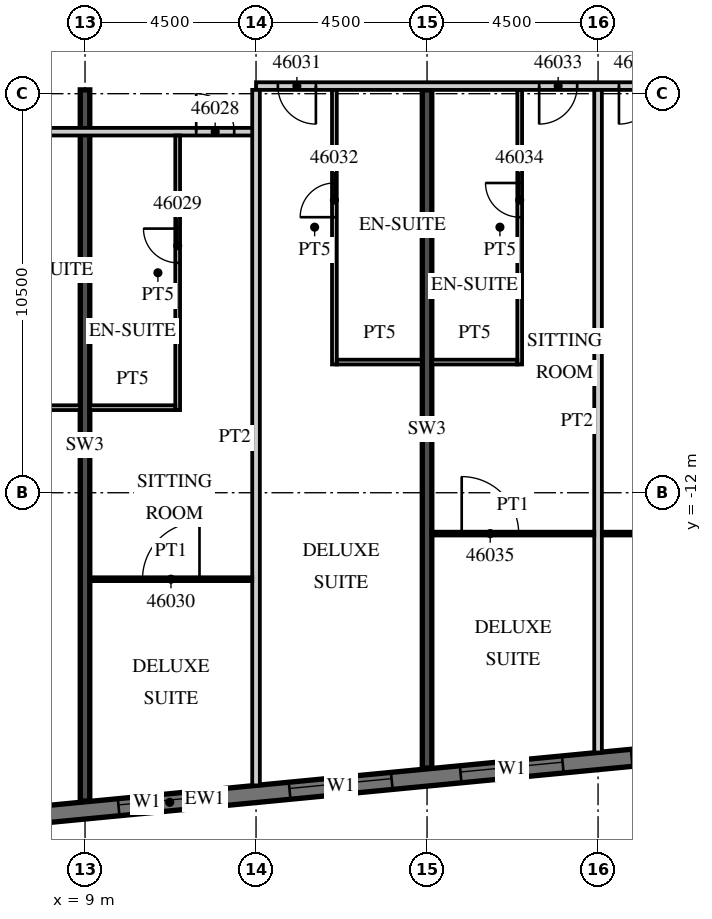
"""IFC4 building model, lengths in metres.
Left out: names, types, materials, properties, quantities, classifications, styles, units other than length and angle.
Written with IfcOpenShell. Run it as: python <this file> out.ifc"""

import sys

from ifc_helpers import new_model, si_unit, direction, frame, frame_2d, origin, place, context, subcontext, project, spatial, rectangle, extrude, element, fill, save


model = new_model("IFC4")
c1 = context("Model", 3, precision=1e-05, world=origin(), true_north=direction((0.0, 1.0)))
c2 = subcontext(c1, "Body", "Model", "MODEL_VIEW")
j1 = project(units=[si_unit("LENGTHUNIT", "METRE"), si_unit("PLANEANGLEUNIT", "RADIAN")], contexts=[c1])
p1 = place(None, origin())
s1 = spatial("IfcSite", under=j1, at=p1, CompositionType="ELEMENT")
p2 = place(p1, origin())
s2 = spatial("IfcBuilding", under=s1, at=p2, CompositionType="ELEMENT")
p3 = place(p2, frame((0.0, 0.0, 193.3)))
s3 = spatial("IfcBuildingStorey", under=s2, at=p3, CompositionType="ELEMENT", Elevation=193.3)
p4 = place(p3, frame((9.0, -20.112, 0.0), z_axis=(0.0, 0.0, 1.0), x_axis=(0.0, 1.0, 0.0)))
e1 = element("IfcWall", 1, at=p4, inside=s3, PredefinedType="SHEAR", context=c2, shape_type="SweptSolid", body=[
    extrude(rectangle(XDim=18.712, YDim=0.25, at=frame_2d((9.356, 0.0))), origin(), (0.0, 0.0, 1.0), 3.3),
])
p5 = place(p3, frame((18.0, -19.245, 0.0), z_axis=(0.0, 0.0, 1.0), x_axis=(0.0, 1.0, 0.0)))
e2 = element("IfcWall", 2, at=p5, inside=s3, PredefinedType="SHEAR", context=c2, shape_type="SweptSolid", body=[
    extrude(rectangle(XDim=17.845, YDim=0.25, at=frame_2d((8.923, 0.0))), origin(), (0.0, 0.0, 1.0), 3.3),
])
p6 = place(p3, frame((-13.521, -22.529, 0.0), z_axis=(0.0, 0.0, 1.0), x_axis=(0.995396436651, 0.095843277819, 0.0)))
e3 = element("IfcWall", 3, at=p6, inside=s3, PredefinedType="SOLIDWALL", context=c2, shape_type="SweptSolid", body=[
    extrude(rectangle(XDim=51.578, YDim=0.45, at=frame_2d((25.789, 0.0))), origin(), (0.0, 0.0, 1.0), 3.02),
])
p7 = place(p6, frame((0.91, 0.0, 0.45)))
e4 = element("IfcOpeningElement", 4, at=p7, cuts=e3, PredefinedType="OPENING", context=c2, shape_type="SweptSolid", body=[
    extrude(rectangle(XDim=2.7, YDim=2.25, at=frame_2d((1.35, 1.125))), frame((0.0, 0.235, 0.0), z_axis=(0.0, -1.0, 0.0), x_axis=(1.0, 0.0, 0.0)), (0.0, 0.0, 1.0), 0.47),
])
p8 = place(p6, frame((5.431, 0.0, 0.45)))
e5 = element("IfcOpeningElement", 5, at=p8, cuts=e3, PredefinedType="OPENING", context=c2, shape_type="SweptSolid", body=[
    extrude(rectangle(XDim=2.7, YDim=2.25, at=frame_2d((1.35, 1.125))), frame((0.0, 0.235, 0.0), z_axis=(0.0, -1.0, 0.0), x_axis=(1.0, 0.0, 0.0)), (0.0, 0.0, 1.0), 0.47),
])
p9 = place(p6, frame((9.952, 0.0, 0.45)))
e6 = element("IfcOpeningElement", 6, at=p9, cuts=e3, PredefinedType="OPENING", context=c2, shape_type="SweptSolid", body=[
    extrude(rectangle(XDim=2.7, YDim=2.25, at=frame_2d((1.35, 1.125))), frame((0.0, 0.235, 0.0), z_axis=(0.0, -1.0, 0.0), x_axis=(1.0, 0.0, 0.0)), (0.0, 0.0, 1.0), 0.47),
])
p10 = place(p6, frame((14.473, 0.0, 0.45)))
e7 = element("IfcOpeningElement", 7, at=p10, cuts=e3, PredefinedType="OPENING", context=c2, shape_type="SweptSolid", body=[
    extrude(rectangle(XDim=2.7, YDim=2.25, at=frame_2d((1.35, 1.125))), frame((0.0, 0.235, 0.0), z_axis=(0.0, -1.0, 0.0), x_axis=(1.0, 0.0, 0.0)), (0.0, 0.0, 1.0), 0.47),
])
p11 = place(p6, frame((18.994, 0.0, 0.45)))
e8 = element("IfcOpeningElement", 8, at=p11, cuts=e3, PredefinedType="OPENING", context=c2, shape_type="SweptSolid", body=[
    extrude(rectangle(XDim=2.7, YDim=2.25, at=frame_2d((1.35, 1.125))), frame((0.0, 0.235, 0.0), z_axis=(0.0, -1.0, 0.0), x_axis=(1.0, 0.0, 0.0)), (0.0, 0.0, 1.0), 0.47),
])
p12 = place(p6, frame((23.514, 0.0, 0.45)))
e9 = element("IfcOpeningElement", 9, at=p12, cuts=e3, PredefinedType="OPENING", context=c2, shape_type="SweptSolid", body=[
    extrude(rectangle(XDim=2.7, YDim=2.25, at=frame_2d((1.35, 1.125))), frame((0.0, 0.235, 0.0), z_axis=(0.0, -1.0, 0.0), x_axis=(1.0, 0.0, 0.0)), (0.0, 0.0, 1.0), 0.47),
])
p13 = place(p6, frame((28.035, 0.0, 0.45)))
e10 = element("IfcOpeningElement", 10, at=p13, cuts=e3, PredefinedType="OPENING", context=c2, shape_type="SweptSolid", body=[
    extrude(rectangle(XDim=2.7, YDim=2.25, at=frame_2d((1.35, 1.125))), frame((0.0, 0.235, 0.0), z_axis=(0.0, -1.0, 0.0), x_axis=(1.0, 0.0, 0.0)), (0.0, 0.0, 1.0), 0.47),
])
p14 = place(p6, frame((32.556, 0.0, 0.45)))
e11 = element("IfcOpeningElement", 11, at=p14, cuts=e3, PredefinedType="OPENING", context=c2, shape_type="SweptSolid", body=[
    extrude(rectangle(XDim=2.7, YDim=2.25, at=frame_2d((1.35, 1.125))), frame((0.0, 0.235, 0.0), z_axis=(0.0, -1.0, 0.0), x_axis=(1.0, 0.0, 0.0)), (0.0, 0.0, 1.0), 0.47),
])
p15 = place(p6, frame((37.077, 0.0, 0.45)))
e12 = element("IfcOpeningElement", 12, at=p15, cuts=e3, PredefinedType="OPENING", context=c2, shape_type="SweptSolid", body=[
    extrude(rectangle(XDim=2.7, YDim=2.25, at=frame_2d((1.35, 1.125))), frame((0.0, 0.235, 0.0), z_axis=(0.0, -1.0, 0.0), x_axis=(1.0, 0.0, 0.0)), (0.0, 0.0, 1.0), 0.47),
])
p16 = place(p6, frame((41.598, 0.0, 0.45)))
e13 = element("IfcOpeningElement", 13, at=p16, cuts=e3, PredefinedType="OPENING", context=c2, shape_type="SweptSolid", body=[
    extrude(rectangle(XDim=2.7, YDim=2.25, at=frame_2d((1.35, 1.125))), frame((0.0, 0.235, 0.0), z_axis=(0.0, -1.0, 0.0), x_axis=(1.0, 0.0, 0.0)), (0.0, 0.0, 1.0), 0.47),
])
p17 = place(p6, frame((46.119, 0.0, 0.45)))
e14 = element("IfcOpeningElement", 14, at=p17, cuts=e3, PredefinedType="OPENING", context=c2, shape_type="SweptSolid", body=[
    extrude(rectangle(XDim=2.7, YDim=2.25, at=frame_2d((1.35, 1.125))), frame((0.0, 0.235, 0.0), z_axis=(0.0, -1.0, 0.0), x_axis=(1.0, 0.0, 0.0)), (0.0, 0.0, 1.0), 0.47),
])
p18 = place(p3, frame((-13.5, -2.5, 0.0), z_axis=(0.0, 0.0, 1.0), x_axis=(1.0, 0.0, 0.0)))
e15 = element("IfcWall", 15, at=p18, inside=s3, PredefinedType="PARTITIONING", context=c2, shape_type="SweptSolid", body=[
    extrude(rectangle(XDim=27.0, YDim=0.2, at=frame_2d((13.5, 0.0))), origin(), (0.0, 0.0, 1.0), 3.02),
])
p19 = place(p18, frame((2.925, 0.0, 0.0)))
e16 = element("IfcOpeningElement", 16, at=p19, cuts=e15, PredefinedType="OPENING", context=c2, shape_type="SweptSolid", body=[
    extrude(rectangle(XDim=1.0, YDim=2.1, at=frame_2d((0.5, 1.05))), frame((0.0, 0.11, 0.0), z_axis=(0.0, -1.0, 0.0), x_axis=(1.0, 0.0, 0.0)), (0.0, 0.0, 1.0), 0.22),
])
p20 = place(p18, frame((5.075, 0.0, 0.0)))
e17 = element("IfcOpeningElement", 17, at=p20, cuts=e15, PredefinedType="OPENING", context=c2, shape_type="SweptSolid", body=[
    extrude(rectangle(XDim=1.0, YDim=2.1, at=frame_2d((0.5, 1.05))), frame((0.0, 0.11, 0.0), z_axis=(0.0, -1.0, 0.0), x_axis=(1.0, 0.0, 0.0)), (0.0, 0.0, 1.0), 0.22),
])
p21 = place(p18, frame((11.925, 0.0, 0.0)))
e18 = element("IfcOpeningElement", 18, at=p21, cuts=e15, PredefinedType="OPENING", context=c2, shape_type="SweptSolid", body=[
    extrude(rectangle(XDim=1.0, YDim=2.1, at=frame_2d((0.5, 1.05))), frame((0.0, 0.11, 0.0), z_axis=(0.0, -1.0, 0.0), x_axis=(1.0, 0.0, 0.0)), (0.0, 0.0, 1.0), 0.22),
])
p22 = place(p18, frame((15.938, 0.0, 0.0)))
e19 = element("IfcOpeningElement", 19, at=p22, cuts=e15, PredefinedType="OPENING", context=c2, shape_type="SweptSolid", body=[
    extrude(rectangle(XDim=1.2, YDim=2.1, at=frame_2d((0.6, 1.05))), frame((0.0, 0.11, 0.0), z_axis=(0.0, -1.0, 0.0), x_axis=(1.0, 0.0, 0.0)), (0.0, 0.0, 1.0), 0.22),
])
p23 = place(p18, frame((25.425, 0.0, 0.0)))
e20 = element("IfcOpeningElement", 20, at=p23, cuts=e15, PredefinedType="OPENING", context=c2, shape_type="SweptSolid", body=[
    extrude(rectangle(XDim=1.0, YDim=2.1, at=frame_2d((0.5, 1.05))), frame((0.0, 0.11, 0.0), z_axis=(0.0, -1.0, 0.0), x_axis=(1.0, 0.0, 0.0)), (0.0, 0.0, 1.0), 0.22),
])
p24 = place(p3, frame((13.5, -1.3, 0.0), z_axis=(0.0, 0.0, 1.0), x_axis=(1.0, 0.0, 0.0)))
e21 = element("IfcWall", 21, at=p24, inside=s3, PredefinedType="PARTITIONING", context=c2, shape_type="SweptSolid", body=[
    extrude(rectangle(XDim=26.317, YDim=0.2, at=frame_2d((13.158, 0.0))), origin(), (0.0, 0.0, 1.0), 3.02),
])
p25 = place(p24, frame((0.575, 0.0, 0.0)))
e22 = element("IfcOpeningElement", 22, at=p25, cuts=e21, PredefinedType="OPENING", context=c2, shape_type="SweptSolid", body=[
    extrude(rectangle(XDim=1.0, YDim=2.1, at=frame_2d((0.5, 1.05))), frame((0.0, 0.11, 0.0), z_axis=(0.0, -1.0, 0.0), x_axis=(1.0, 0.0, 0.0)), (0.0, 0.0, 1.0), 0.22),
])
p26 = place(p24, frame((7.45, 0.0, 0.0)))
e23 = element("IfcOpeningElement", 23, at=p26, cuts=e21, PredefinedType="OPENING", context=c2, shape_type="SweptSolid", body=[
    extrude(rectangle(XDim=1.0, YDim=2.1, at=frame_2d((0.5, 1.05))), frame((0.0, 0.11, 0.0), z_axis=(0.0, -1.0, 0.0), x_axis=(1.0, 0.0, 0.0)), (0.0, 0.0, 1.0), 0.22),
])
p27 = place(p24, frame((9.55, 0.0, 0.0)))
e24 = element("IfcOpeningElement", 24, at=p27, cuts=e21, PredefinedType="OPENING", context=c2, shape_type="SweptSolid", body=[
    extrude(rectangle(XDim=1.0, YDim=2.1, at=frame_2d((0.5, 1.05))), frame((0.0, 0.11, 0.0), z_axis=(0.0, -1.0, 0.0), x_axis=(1.0, 0.0, 0.0)), (0.0, 0.0, 1.0), 0.22),
])
p28 = place(p24, frame((16.45, 0.0, 0.0)))
e25 = element("IfcOpeningElement", 25, at=p28, cuts=e21, PredefinedType="OPENING", context=c2, shape_type="SweptSolid", body=[
    extrude(rectangle(XDim=1.0, YDim=2.1, at=frame_2d((0.5, 1.05))), frame((0.0, 0.11, 0.0), z_axis=(0.0, -1.0, 0.0), x_axis=(1.0, 0.0, 0.0)), (0.0, 0.0, 1.0), 0.22),
])
p29 = place(p24, frame((20.925, 0.0, 0.0)))
e26 = element("IfcOpeningElement", 26, at=p29, cuts=e21, PredefinedType="OPENING", context=c2, shape_type="SweptSolid", body=[
    extrude(rectangle(XDim=1.0, YDim=2.1, at=frame_2d((0.5, 1.05))), frame((0.0, 0.11, 0.0), z_axis=(0.0, -1.0, 0.0), x_axis=(1.0, 0.0, 0.0)), (0.0, 0.0, 1.0), 0.22),
])
p30 = place(p24, frame((25.267, 0.0, 0.0)))
e27 = element("IfcOpeningElement", 27, at=p30, cuts=e21, PredefinedType="OPENING", context=c2, shape_type="SweptSolid", body=[
    extrude(rectangle(XDim=0.9, YDim=2.1, at=frame_2d((0.45, 1.05))), frame((0.0, 0.11, 0.0), z_axis=(0.0, -1.0, 0.0), x_axis=(1.0, 0.0, 0.0)), (0.0, 0.0, 1.0), 0.22),
])
p31 = place(p3, frame((6.075, -9.762, 0.0), z_axis=(0.0, 0.0, 1.0), x_axis=(1.0, 0.0, 0.0)))
e28 = element("IfcWall", 28, at=p31, inside=s3, PredefinedType="PARTITIONING", context=c2, shape_type="SweptSolid", body=[
    extrude(rectangle(XDim=2.8, YDim=0.125, at=frame_2d((1.4, 0.0))), origin(), (0.0, 0.0, 1.0), 3.02),
])
p32 = place(p3, frame((13.5, -19.701, 0.0), z_axis=(0.0, 0.0, 1.0), x_axis=(0.0, 1.0, 0.0)))
e29 = element("IfcWall", 29, at=p32, inside=s3, PredefinedType="PARTITIONING", context=c2, shape_type="SweptSolid", body=[
    extrude(rectangle(XDim=18.301, YDim=0.2, at=frame_2d((9.15, 0.0))), origin(), (0.0, 0.0, 1.0), 3.02),
])
p33 = place(p3, frame((11.438, -9.825, 0.0), z_axis=(0.0, 0.0, 1.0), x_axis=(0.0, 1.0, 0.0)))
e30 = element("IfcWall", 30, at=p33, inside=s3, PredefinedType="PARTITIONING", context=c2, shape_type="SweptSolid", body=[
    extrude(rectangle(XDim=7.225, YDim=0.125, at=frame_2d((3.612, 0.0))), origin(), (0.0, 0.0, 1.0), 3.02),
])
p34 = place(p33, frame((3.875, 0.0, 0.0)))
e31 = element("IfcOpeningElement", 31, at=p34, cuts=e30, PredefinedType="OPENING", context=c2, shape_type="SweptSolid", body=[
    extrude(rectangle(XDim=0.9, YDim=2.1, at=frame_2d((0.45, 1.05))), frame((0.0, 0.073, 0.0), z_axis=(0.0, -1.0, 0.0), x_axis=(1.0, 0.0, 0.0)), (0.0, 0.0, 1.0), 0.145),
])
p35 = place(p3, frame((9.125, -9.762, 0.0), z_axis=(0.0, 0.0, 1.0), x_axis=(1.0, 0.0, 0.0)))
e32 = element("IfcWall", 32, at=p35, inside=s3, PredefinedType="PARTITIONING", context=c2, shape_type="SweptSolid", body=[
    extrude(rectangle(XDim=2.25, YDim=0.125, at=frame_2d((1.125, 0.0))), origin(), (0.0, 0.0, 1.0), 3.02),
])
p36 = place(p3, frame((9.125, -14.275, 0.0), z_axis=(0.0, 0.0, 1.0), x_axis=(1.0, 0.0, 0.0)))
e33 = element("IfcWall", 33, at=p36, inside=s3, PredefinedType="PARTITIONING", context=c2, shape_type="SweptSolid", body=[
    extrude(rectangle(XDim=4.275, YDim=0.1, at=frame_2d((2.137, 0.0))), origin(), (0.0, 0.0, 1.0), 3.02),
])
p37 = place(p36, frame((1.387, 0.0, 0.0)))
e34 = element("IfcOpeningElement", 34, at=p37, cuts=e33, PredefinedType="OPENING", context=c2, shape_type="SweptSolid", body=[
    extrude(rectangle(XDim=1.5, YDim=2.1, at=frame_2d((0.75, 1.05))), frame((0.0, 0.06, 0.0), z_axis=(0.0, -1.0, 0.0), x_axis=(1.0, 0.0, 0.0)), (0.0, 0.0, 1.0), 0.12),
])
p38 = place(p3, frame((15.562, -8.625, 0.0), z_axis=(0.0, 0.0, 1.0), x_axis=(0.0, 1.0, 0.0)))
e35 = element("IfcWall", 35, at=p38, inside=s3, PredefinedType="PARTITIONING", context=c2, shape_type="SweptSolid", body=[
    extrude(rectangle(XDim=7.225, YDim=0.125, at=frame_2d((3.613, 0.0))), origin(), (0.0, 0.0, 1.0), 3.02),
])
p39 = place(p38, frame((3.875, 0.0, 0.0)))
e36 = element("IfcOpeningElement", 36, at=p39, cuts=e35, PredefinedType="OPENING", context=c2, shape_type="SweptSolid", body=[
    extrude(rectangle(XDim=0.9, YDim=2.1, at=frame_2d((0.45, 1.05))), frame((0.0, 0.073, 0.0), z_axis=(0.0, -1.0, 0.0), x_axis=(1.0, 0.0, 0.0)), (0.0, 0.0, 1.0), 0.145),
])
p40 = place(p3, frame((15.625, -8.562, 0.0), z_axis=(0.0, 0.0, 1.0), x_axis=(1.0, 0.0, 0.0)))
e37 = element("IfcWall", 37, at=p40, inside=s3, PredefinedType="PARTITIONING", context=c2, shape_type="SweptSolid", body=[
    extrude(rectangle(XDim=2.25, YDim=0.125, at=frame_2d((1.125, 0.0))), origin(), (0.0, 0.0, 1.0), 3.02),
])
p41 = place(p3, frame((22.5, -18.834, 0.0), z_axis=(0.0, 0.0, 1.0), x_axis=(0.0, 1.0, 0.0)))
e38 = element("IfcWall", 38, at=p41, inside=s3, PredefinedType="PARTITIONING", context=c2, shape_type="SweptSolid", body=[
    extrude(rectangle(XDim=17.434, YDim=0.2, at=frame_2d((8.717, 0.0))), origin(), (0.0, 0.0, 1.0), 3.02),
])
p42 = place(p3, frame((20.438, -8.625, 0.0), z_axis=(0.0, 0.0, 1.0), x_axis=(0.0, 1.0, 0.0)))
e39 = element("IfcWall", 39, at=p42, inside=s3, PredefinedType="PARTITIONING", context=c2, shape_type="SweptSolid", body=[
    extrude(rectangle(XDim=7.225, YDim=0.125, at=frame_2d((3.613, 0.0))), origin(), (0.0, 0.0, 1.0), 3.02),
])
p43 = place(p42, frame((3.875, 0.0, 0.0)))
e40 = element("IfcOpeningElement", 40, at=p43, cuts=e39, PredefinedType="OPENING", context=c2, shape_type="SweptSolid", body=[
    extrude(rectangle(XDim=0.9, YDim=2.1, at=frame_2d((0.45, 1.05))), frame((0.0, 0.073, 0.0), z_axis=(0.0, -1.0, 0.0), x_axis=(1.0, 0.0, 0.0)), (0.0, 0.0, 1.0), 0.145),
])
p44 = place(p3, frame((18.125, -8.562, 0.0), z_axis=(0.0, 0.0, 1.0), x_axis=(1.0, 0.0, 0.0)))
e41 = element("IfcWall", 41, at=p44, inside=s3, PredefinedType="PARTITIONING", context=c2, shape_type="SweptSolid", body=[
    extrude(rectangle(XDim=2.25, YDim=0.125, at=frame_2d((1.125, 0.0))), origin(), (0.0, 0.0, 1.0), 3.02),
])
p45 = place(p3, frame((18.125, -13.075, 0.0), z_axis=(0.0, 0.0, 1.0), x_axis=(1.0, 0.0, 0.0)))
e42 = element("IfcWall", 42, at=p45, inside=s3, PredefinedType="PARTITIONING", context=c2, shape_type="SweptSolid", body=[
    extrude(rectangle(XDim=4.275, YDim=0.1, at=frame_2d((2.137, 0.0))), origin(), (0.0, 0.0, 1.0), 3.02),
])
p46 = place(p45, frame((0.787, 0.0, 0.0)))
e43 = element("IfcOpeningElement", 43, at=p46, cuts=e42, PredefinedType="OPENING", context=c2, shape_type="SweptSolid", body=[
    extrude(rectangle(XDim=1.5, YDim=2.1, at=frame_2d((0.75, 1.05))), frame((0.0, 0.06, 0.0), z_axis=(0.0, -1.0, 0.0), x_axis=(1.0, 0.0, 0.0)), (0.0, 0.0, 1.0), 0.12),
])
p47 = place(p3, frame((22.6, -13.075, 0.0), z_axis=(0.0, 0.0, 1.0), x_axis=(1.0, 0.0, 0.0)))
e44 = element("IfcWall", 44, at=p47, inside=s3, PredefinedType="PARTITIONING", context=c2, shape_type="SweptSolid", body=[
    extrude(rectangle(XDim=4.275, YDim=0.1, at=frame_2d((2.137, 0.0))), origin(), (0.0, 0.0, 1.0), 3.02),
])
p48 = place(p47, frame((1.988, 0.0, 0.0)))
e45 = element("IfcOpeningElement", 45, at=p48, cuts=e44, PredefinedType="OPENING", context=c2, shape_type="SweptSolid", body=[
    extrude(rectangle(XDim=1.5, YDim=2.1, at=frame_2d((0.75, 1.05))), frame((0.0, 0.06, 0.0), z_axis=(0.0, -1.0, 0.0), x_axis=(1.0, 0.0, 0.0)), (0.0, 0.0, 1.0), 0.12),
])
p49 = place(p12, origin())
e46 = element("IfcWindow", 46, at=p49, inside=s3, PartitioningType="SINGLE_PANEL", PredefinedType="WINDOW", context=c2, shape_type="SweptSolid", body=[
    extrude(rectangle(XDim=2.7, YDim=2.25, at=frame_2d((1.35, 1.125))), frame((0.0, 0.09, 0.0), z_axis=(0.0, -1.0, 0.0), x_axis=(1.0, 0.0, 0.0)), (0.0, 0.0, 1.0), 0.06),
])
fill(e9, e46)
p50 = place(p13, origin())
e47 = element("IfcWindow", 47, at=p50, inside=s3, PartitioningType="SINGLE_PANEL", PredefinedType="WINDOW", context=c2, shape_type="SweptSolid", body=[
    extrude(rectangle(XDim=2.7, YDim=2.25, at=frame_2d((1.35, 1.125))), frame((0.0, 0.09, 0.0), z_axis=(0.0, -1.0, 0.0), x_axis=(1.0, 0.0, 0.0)), (0.0, 0.0, 1.0), 0.06),
])
fill(e10, e47)
p51 = place(p14, origin())
e48 = element("IfcWindow", 48, at=p51, inside=s3, PartitioningType="SINGLE_PANEL", PredefinedType="WINDOW", context=c2, shape_type="SweptSolid", body=[
    extrude(rectangle(XDim=2.7, YDim=2.25, at=frame_2d((1.35, 1.125))), frame((0.0, 0.09, 0.0), z_axis=(0.0, -1.0, 0.0), x_axis=(1.0, 0.0, 0.0)), (0.0, 0.0, 1.0), 0.06),
])
fill(e11, e48)
p52 = place(p15, origin())
e49 = element("IfcWindow", 49, at=p52, inside=s3, PartitioningType="SINGLE_PANEL", PredefinedType="WINDOW", context=c2, shape_type="SweptSolid", body=[
    extrude(rectangle(XDim=2.7, YDim=2.25, at=frame_2d((1.35, 1.125))), frame((0.0, 0.09, 0.0), z_axis=(0.0, -1.0, 0.0), x_axis=(1.0, 0.0, 0.0)), (0.0, 0.0, 1.0), 0.06),
])
fill(e12, e49)
p53 = place(p23, origin())
e50 = element("IfcDoor", 50, at=p53, inside=s3, OperationType="SINGLE_SWING_LEFT", PredefinedType="DOOR", context=c2, shape_type="SweptSolid", body=[
    extrude(rectangle(XDim=1.0, YDim=2.1, at=frame_2d((0.5, 1.05))), frame((0.0, 0.025, 0.0), z_axis=(0.0, -1.0, 0.0), x_axis=(1.0, 0.0, 0.0)), (0.0, 0.0, 1.0), 0.05),
])
fill(e20, e50)
p54 = place(p34, origin())
e51 = element("IfcDoor", 51, at=p54, inside=s3, OperationType="SINGLE_SWING_RIGHT", PredefinedType="DOOR", context=c2, shape_type="SweptSolid", body=[
    extrude(rectangle(XDim=0.9, YDim=2.1, at=frame_2d((0.45, 1.05))), frame((0.0, 0.025, 0.0), z_axis=(0.0, -1.0, 0.0), x_axis=(1.0, 0.0, 0.0)), (0.0, 0.0, 1.0), 0.05),
])
fill(e31, e51)
p55 = place(p37, origin())
e52 = element("IfcDoor", 52, at=p55, inside=s3, OperationType="SINGLE_SWING_RIGHT", PredefinedType="DOOR", context=c2, shape_type="SweptSolid", body=[
    extrude(rectangle(XDim=1.5, YDim=2.1, at=frame_2d((0.75, 1.05))), frame((0.0, 0.025, 0.0), z_axis=(0.0, -1.0, 0.0), x_axis=(1.0, 0.0, 0.0)), (0.0, 0.0, 1.0), 0.05),
])
fill(e34, e52)
p56 = place(p25, origin())
e53 = element("IfcDoor", 53, at=p56, inside=s3, OperationType="SINGLE_SWING_RIGHT", PredefinedType="DOOR", context=c2, shape_type="SweptSolid", body=[
    extrude(rectangle(XDim=1.0, YDim=2.1, at=frame_2d((0.5, 1.05))), frame((0.0, 0.025, 0.0), z_axis=(0.0, -1.0, 0.0), x_axis=(1.0, 0.0, 0.0)), (0.0, 0.0, 1.0), 0.05),
])
fill(e22, e53)
p57 = place(p39, origin())
e54 = element("IfcDoor", 54, at=p57, inside=s3, OperationType="SINGLE_SWING_LEFT", PredefinedType="DOOR", context=c2, shape_type="SweptSolid", body=[
    extrude(rectangle(XDim=0.9, YDim=2.1, at=frame_2d((0.45, 1.05))), frame((0.0, 0.025, 0.0), z_axis=(0.0, -1.0, 0.0), x_axis=(1.0, 0.0, 0.0)), (0.0, 0.0, 1.0), 0.05),
])
fill(e36, e54)
p58 = place(p26, origin())
e55 = element("IfcDoor", 55, at=p58, inside=s3, OperationType="SINGLE_SWING_LEFT", PredefinedType="DOOR", context=c2, shape_type="SweptSolid", body=[
    extrude(rectangle(XDim=1.0, YDim=2.1, at=frame_2d((0.5, 1.05))), frame((0.0, 0.025, 0.0), z_axis=(0.0, -1.0, 0.0), x_axis=(1.0, 0.0, 0.0)), (0.0, 0.0, 1.0), 0.05),
])
fill(e23, e55)
p59 = place(p43, origin())
e56 = element("IfcDoor", 56, at=p59, inside=s3, OperationType="SINGLE_SWING_RIGHT", PredefinedType="DOOR", context=c2, shape_type="SweptSolid", body=[
    extrude(rectangle(XDim=0.9, YDim=2.1, at=frame_2d((0.45, 1.05))), frame((0.0, 0.025, 0.0), z_axis=(0.0, -1.0, 0.0), x_axis=(1.0, 0.0, 0.0)), (0.0, 0.0, 1.0), 0.05),
])
fill(e40, e56)
p60 = place(p46, origin())
e57 = element("IfcDoor", 57, at=p60, inside=s3, OperationType="SINGLE_SWING_LEFT", PredefinedType="DOOR", context=c2, shape_type="SweptSolid", body=[
    extrude(rectangle(XDim=1.5, YDim=2.1, at=frame_2d((0.75, 1.05))), frame((0.0, 0.025, 0.0), z_axis=(0.0, -1.0, 0.0), x_axis=(1.0, 0.0, 0.0)), (0.0, 0.0, 1.0), 0.05),
])
fill(e43, e57)
p61 = place(p27, origin())
e58 = element("IfcDoor", 58, at=p61, inside=s3, OperationType="SINGLE_SWING_LEFT", PredefinedType="DOOR", context=c2, shape_type="SweptSolid", body=[
    extrude(rectangle(XDim=1.0, YDim=2.1, at=frame_2d((0.5, 1.05))), frame((0.0, 0.025, 0.0), z_axis=(0.0, -1.0, 0.0), x_axis=(1.0, 0.0, 0.0)), (0.0, 0.0, 1.0), 0.05),
])
fill(e24, e58)
save(model, sys.argv[1])
